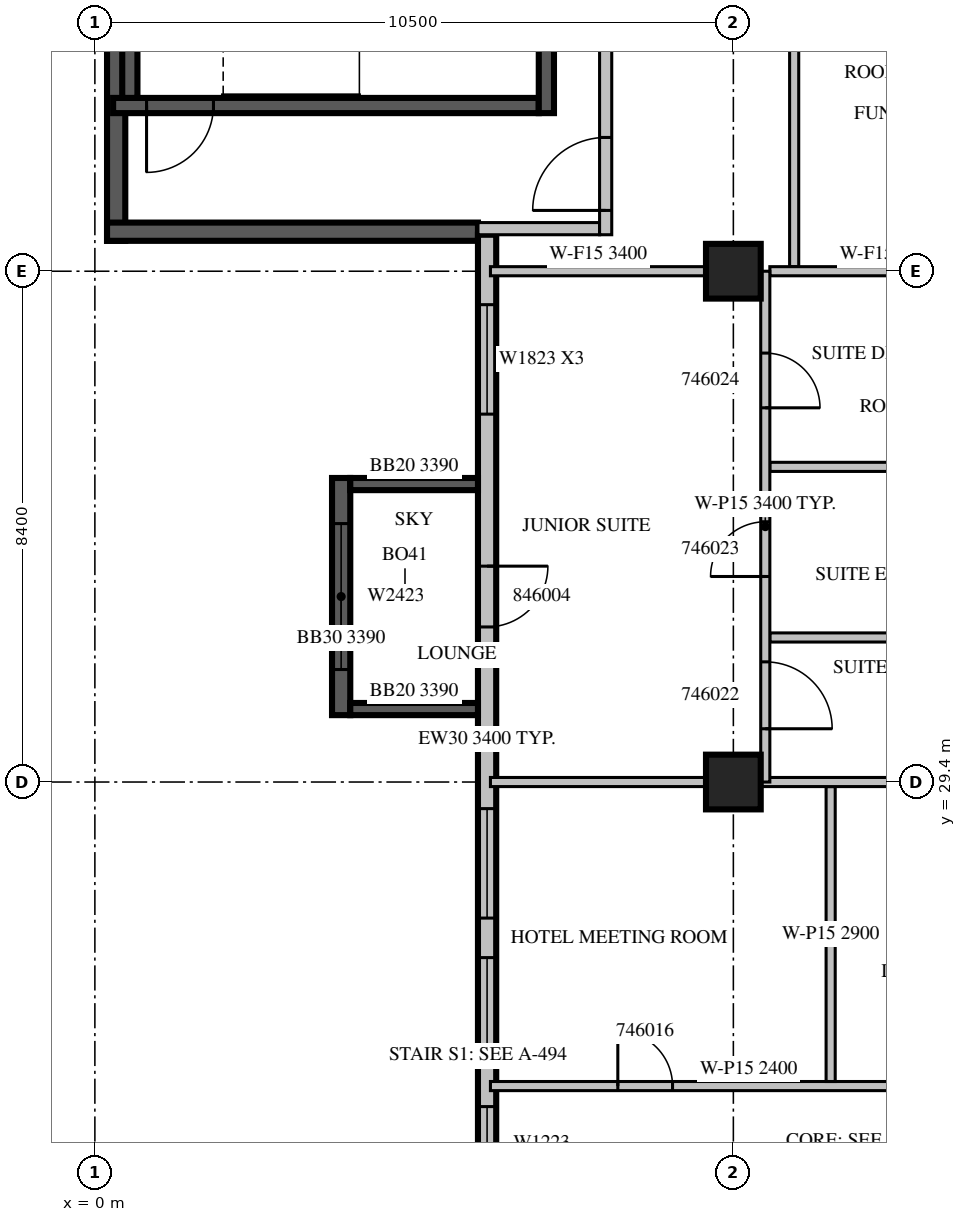
"""IFC4 building model, lengths in metres.
Left out: names, types, materials, properties, quantities, classifications, styles, units other than length and angle.
Written with IfcOpenShell. Run it as: python <this file> out.ifc"""

import sys

from ifc_helpers import new_model, si_unit, direction, frame, frame_2d, origin, origin_2d, place, context, subcontext, project, spatial, rectangle, extrude, source, transform, mapped, element, fill, save


model = new_model("IFC4")
c1 = context("Model", 3, precision=1e-05, world=origin(), true_north=direction((0.0, 1.0)))
c2 = subcontext(c1, "Body", "Model", "MODEL_VIEW")
j1 = project(units=[si_unit("LENGTHUNIT", "METRE"), si_unit("PLANEANGLEUNIT", "RADIAN")], contexts=[c1])
p1 = place(None, origin())
s1 = spatial("IfcSite", under=j1, at=p1, CompositionType="ELEMENT")
p2 = place(p1, origin())
s2 = spatial("IfcBuilding", under=s1, at=p2, CompositionType="ELEMENT")
p3 = place(p2, frame((0.0, 0.0, 208.2)))
s3 = spatial("IfcBuildingStorey", under=s2, at=p3, CompositionType="ELEMENT", Elevation=208.2)
m1 = source(origin(), c2, "Body", "SweptSolid", [
    extrude(rectangle(XDim=0.9, YDim=0.9, at=origin_2d()), origin(), (0.0, 0.0, 1.0), 3.8),
])
for number, where, z_axis, x_axis in (
    (1, (10.5, 29.4, 0.0), (0.0, 0.0, 1.0), (1.0, 0.0, 0.0)),
    (2, (10.5, 37.8, 0.0), (0.0, 0.0, 1.0), (1.0, 0.0, 0.0)),
):
    element("IfcColumn", number, at=place(p3, frame(where, z_axis=z_axis, x_axis=x_axis)), inside=s3, PredefinedType="COLUMN", context=c2, shape_type="MappedRepresentation", body=[
        mapped(m1, transform((0.0, 0.0, 0.0), scale=1.0)),
    ])
m2 = source(origin(), c2, "Body", "SweptSolid", [
    extrude(rectangle(XDim=5.65, YDim=0.3, at=frame_2d((2.825, 0.0))), origin(), (0.0, 0.0, 1.0), 3.4),
])
p4 = place(p3, frame((0.35, 43.95, 0.0), z_axis=(0.0, 0.0, 1.0), x_axis=(0.0, -1.0, 0.0)))
e3 = element("IfcWall", 3, at=p4, inside=s3, PredefinedType="SOLIDWALL", context=c2, shape_type="MappedRepresentation", body=[
    mapped(m2, transform((0.0, 0.0, 0.0), scale=1.0)),
])
m3 = source(origin(), c2, "Body", "SweptSolid", [
    extrude(rectangle(XDim=6.1, YDim=0.3, at=frame_2d((3.05, 0.0))), origin(), (0.0, 0.0, 1.0), 3.4),
])
p5 = place(p3, frame((0.2, 38.45, 0.0), z_axis=(0.0, 0.0, 1.0), x_axis=(1.0, 0.0, 0.0)))
e4 = element("IfcWall", 4, at=p5, inside=s3, PredefinedType="SOLIDWALL", context=c2, shape_type="MappedRepresentation", body=[
    mapped(m3, transform((0.0, 0.0, 0.0), scale=1.0)),
])
m4 = source(origin(), c2, "Body", "SweptSolid", [
    extrude(rectangle(XDim=16.6, YDim=0.3, at=frame_2d((8.3, 0.0))), origin(), (0.0, 0.0, 1.0), 3.4),
])
p6 = place(p3, frame((6.45, 38.4, 0.0), z_axis=(0.0, 0.0, 1.0), x_axis=(0.0, -1.0, 0.0)))
e5 = element("IfcWall", 5, at=p6, inside=s3, PredefinedType="STANDARD", context=c2, shape_type="MappedRepresentation", body=[
    mapped(m4, transform((0.0, 0.0, 0.0), scale=1.0)),
])
m5 = source(origin(), c2, "Body", "SweptSolid", [
    extrude(rectangle(XDim=1.8, YDim=2.3, at=frame_2d((0.9, 1.15))), frame((0.0, 0.16, 0.0), z_axis=(0.0, -1.0, 0.0), x_axis=(1.0, 0.0, 0.0)), (0.0, 0.0, 1.0), 0.32),
])
p7 = place(p6, frame((1.15, 0.0, 0.6)))
e6 = element("IfcOpeningElement", 6, at=p7, cuts=e5, PredefinedType="OPENING", context=c2, shape_type="MappedRepresentation", body=[
    mapped(m5, transform((0.0, 0.0, 0.0), scale=1.0)),
])
p8 = place(p6, frame((9.438, 0.0, 0.6)))
e7 = element("IfcOpeningElement", 7, at=p8, cuts=e5, PredefinedType="OPENING", context=c2, shape_type="MappedRepresentation", body=[
    mapped(m5, transform((0.0, 0.0, 0.0), scale=1.0)),
])
m6 = source(origin(), c2, "Body", "SweptSolid", [
    extrude(rectangle(XDim=1.2, YDim=2.3, at=frame_2d((0.6, 1.15))), frame((0.0, 0.16, 0.0), z_axis=(0.0, -1.0, 0.0), x_axis=(1.0, 0.0, 0.0)), (0.0, 0.0, 1.0), 0.32),
])
p9 = place(p6, frame((14.338, 0.0, 0.6)))
e8 = element("IfcOpeningElement", 8, at=p9, cuts=e5, PredefinedType="OPENING", context=c2, shape_type="MappedRepresentation", body=[
    mapped(m6, transform((0.0, 0.0, 0.0), scale=1.0)),
])
p10 = place(p6, frame((11.887, 0.0, 0.6)))
e9 = element("IfcOpeningElement", 9, at=p10, cuts=e5, PredefinedType="OPENING", context=c2, shape_type="MappedRepresentation", body=[
    mapped(m5, transform((0.0, 0.0, 0.0), scale=1.0)),
])
m7 = source(origin(), c2, "Body", "SweptSolid", [
    extrude(rectangle(XDim=1.0, YDim=2.1, at=frame_2d((0.5, 1.05))), frame((0.0, 0.16, 0.0), z_axis=(0.0, -1.0, 0.0), x_axis=(1.0, 0.0, 0.0)), (0.0, 0.0, 1.0), 0.32),
])
p11 = place(p6, frame((5.45, 0.0, 0.0)))
e10 = element("IfcOpeningElement", 10, at=p11, cuts=e5, PredefinedType="OPENING", context=c2, shape_type="MappedRepresentation", body=[
    mapped(m7, transform((0.0, 0.0, 0.0), scale=1.0)),
])
m8 = source(origin(), c2, "Body", "SweptSolid", [
    extrude(rectangle(XDim=3.9, YDim=0.3, at=frame_2d((1.95, 0.0))), origin(), (0.0, 0.0, 1.0), 3.39),
])
p12 = place(p3, frame((4.05, 34.4, 0.0), z_axis=(0.0, 0.0, 1.0), x_axis=(0.0, -1.0, 0.0)))
e11 = element("IfcWall", 11, at=p12, inside=s3, PredefinedType="SOLIDWALL", context=c2, shape_type="MappedRepresentation", body=[
    mapped(m8, transform((0.0, 0.0, 0.0), scale=1.0)),
])
m9 = source(origin(), c2, "Body", "SweptSolid", [
    extrude(rectangle(XDim=2.4, YDim=2.3, at=frame_2d((1.2, 1.15))), frame((0.0, 0.16, 0.0), z_axis=(0.0, -1.0, 0.0), x_axis=(1.0, 0.0, 0.0)), (0.0, 0.0, 1.0), 0.32),
])
p13 = place(p12, frame((0.75, 0.0, 0.6)))
e12 = element("IfcOpeningElement", 12, at=p13, cuts=e11, PredefinedType="OPENING", context=c2, shape_type="MappedRepresentation", body=[
    mapped(m9, transform((0.0, 0.0, 0.0), scale=1.0)),
])
m10 = source(origin(), c2, "Body", "SweptSolid", [
    extrude(rectangle(XDim=2.1, YDim=0.2, at=frame_2d((1.05, 0.0))), origin(), (0.0, 0.0, 1.0), 3.39),
])
for number, where, z_axis, x_axis in (
    (13, (6.3, 34.3, 0.0), (0.0, 0.0, 1.0), (-1.0, 0.0, 0.0)),
    (14, (6.3, 30.6, 0.0), (0.0, 0.0, 1.0), (-1.0, 0.0, 0.0)),
):
    element("IfcWall", number, at=place(p3, frame(where, z_axis=z_axis, x_axis=x_axis)), inside=s3, PredefinedType="SOLIDWALL", context=c2, shape_type="MappedRepresentation", body=[
        mapped(m10, transform((0.0, 0.0, 0.0), scale=1.0)),
    ])
m11 = source(origin(), c2, "Body", "SweptSolid", [
    extrude(rectangle(XDim=7.0, YDim=0.25, at=frame_2d((3.5, 0.0))), origin(), (0.0, 0.0, 1.0), 3.4),
])
p14 = place(p3, frame((0.3, 40.525, 0.0), z_axis=(0.0, 0.0, 1.0), x_axis=(1.0, 0.0, 0.0)))
e15 = element("IfcWall", 15, at=p14, inside=s3, PredefinedType="SOLIDWALL", context=c2, shape_type="MappedRepresentation", body=[
    mapped(m11, transform((0.0, 0.0, 0.0), scale=1.0)),
])
m12 = source(origin(), c2, "Body", "SweptSolid", [
    extrude(rectangle(XDim=1.1, YDim=2.1, at=frame_2d((0.55, 1.05))), frame((0.0, 0.135, 0.0), z_axis=(0.0, -1.0, 0.0), x_axis=(1.0, 0.0, 0.0)), (0.0, 0.0, 1.0), 0.27),
])
p15 = place(p14, frame((0.55, 0.0, 0.0)))
e16 = element("IfcOpeningElement", 16, at=p15, cuts=e15, PredefinedType="OPENING", context=c2, shape_type="MappedRepresentation", body=[
    mapped(m12, transform((0.0, 0.0, 0.0), scale=1.0)),
])
m13 = source(origin(), c2, "Body", "SweptSolid", [
    extrude(rectangle(XDim=3.45, YDim=0.25, at=frame_2d((1.725, 0.0))), origin(), (0.0, 0.0, 1.0), 3.4),
])
p16 = place(p3, frame((7.425, 40.4, 0.0), z_axis=(0.0, 0.0, 1.0), x_axis=(0.0, 1.0, 0.0)))
e17 = element("IfcWall", 17, at=p16, inside=s3, PredefinedType="SOLIDWALL", context=c2, shape_type="MappedRepresentation", body=[
    mapped(m13, transform((0.0, 0.0, 0.0), scale=1.0)),
])
m14 = source(origin(), c2, "Body", "SweptSolid", [
    extrude(rectangle(XDim=2.95, YDim=0.25, at=frame_2d((1.475, 0.0))), origin(), (0.0, 0.0, 1.0), 3.4),
])
p17 = place(p3, frame((0.575, 40.65, 0.0), z_axis=(0.0, 0.0, 1.0), x_axis=(0.0, 1.0, 0.0)))
e18 = element("IfcWall", 18, at=p17, inside=s3, PredefinedType="SOLIDWALL", context=c2, shape_type="MappedRepresentation", body=[
    mapped(m14, transform((0.0, 0.0, 0.0), scale=1.0)),
])
m15 = source(origin(), c2, "Body", "SweptSolid", [
    extrude(rectangle(XDim=2.0, YDim=0.2, at=frame_2d((1.0, 0.0))), origin(), (0.0, 0.0, 1.0), 3.4),
])
p18 = place(p3, frame((6.3, 38.5, 0.0), z_axis=(0.0, 0.0, 1.0), x_axis=(1.0, 0.0, 0.0)))
e19 = element("IfcWall", 19, at=p18, inside=s3, PredefinedType="PARTITIONING", context=c2, shape_type="MappedRepresentation", body=[
    mapped(m15, transform((0.0, 0.0, 0.0), scale=1.0)),
])
m16 = source(origin(), c2, "Body", "SweptSolid", [
    extrude(rectangle(XDim=5.45, YDim=0.2, at=frame_2d((2.725, 0.0))), origin(), (0.0, 0.0, 1.0), 3.4),
])
p19 = place(p3, frame((8.4, 38.4, 0.0), z_axis=(0.0, 0.0, 1.0), x_axis=(0.0, 1.0, 0.0)))
e20 = element("IfcWall", 20, at=p19, inside=s3, PredefinedType="PARTITIONING", context=c2, shape_type="MappedRepresentation", body=[
    mapped(m16, transform((0.0, 0.0, 0.0), scale=1.0)),
])
m17 = source(origin(), c2, "Body", "SweptSolid", [
    extrude(rectangle(XDim=1.2, YDim=2.1, at=frame_2d((0.6, 1.05))), frame((0.0, 0.11, 0.0), z_axis=(0.0, -1.0, 0.0), x_axis=(1.0, 0.0, 0.0)), (0.0, 0.0, 1.0), 0.22),
])
p20 = place(p19, frame((0.4, 0.0, 0.0)))
e21 = element("IfcOpeningElement", 21, at=p20, cuts=e20, PredefinedType="OPENING", context=c2, shape_type="MappedRepresentation", body=[
    mapped(m17, transform((0.0, 0.0, 0.0), scale=1.0)),
])
m18 = source(origin(), c2, "Body", "SweptSolid", [
    extrude(rectangle(XDim=0.9, YDim=2.1, at=frame_2d((0.45, 1.05))), frame((0.0, 0.11, 0.0), z_axis=(0.0, -1.0, 0.0), x_axis=(1.0, 0.0, 0.0)), (0.0, 0.0, 1.0), 0.22),
])
p21 = place(p19, frame((3.25, 0.0, 0.0)))
e22 = element("IfcOpeningElement", 22, at=p21, cuts=e20, PredefinedType="OPENING", context=c2, shape_type="MappedRepresentation", body=[
    mapped(m18, transform((0.0, 0.0, 0.0), scale=1.0)),
])
p22 = place(p3, frame((6.505, 24.4, 0.0), z_axis=(0.0, 0.0, 1.0), x_axis=(1.0, 0.0, 0.0)))
e23 = element("IfcWall", 23, at=p22, inside=s3, PredefinedType="PARTITIONING", context=c2, shape_type="SweptSolid", body=[
    extrude(rectangle(XDim=8.495, YDim=0.15, at=frame_2d((4.247, 0.0))), origin(), (0.0, 0.0, 1.0), 2.4),
])
m19 = source(origin(), c2, "Body", "SweptSolid", [
    extrude(rectangle(XDim=0.9, YDim=2.1, at=frame_2d((0.45, 1.05))), frame((0.0, 0.085, 0.0), z_axis=(0.0, -1.0, 0.0), x_axis=(1.0, 0.0, 0.0)), (0.0, 0.0, 1.0), 0.17),
])
p23 = place(p22, frame((2.095, 0.0, 0.0)))
e24 = element("IfcOpeningElement", 24, at=p23, cuts=e23, PredefinedType="OPENING", context=c2, shape_type="MappedRepresentation", body=[
    mapped(m19, transform((0.0, 0.0, 0.0), scale=1.0)),
])
p24 = place(p22, frame((7.17, 0.0, 0.0)))
e25 = element("IfcOpeningElement", 25, at=p24, cuts=e23, PredefinedType="OPENING", context=c2, shape_type="MappedRepresentation", body=[
    mapped(m19, transform((0.0, 0.0, 0.0), scale=1.0)),
])
p25 = place(p3, frame((12.1, 24.475, 0.0), z_axis=(0.0, 0.0, 1.0), x_axis=(0.0, 1.0, 0.0)))
e26 = element("IfcWall", 26, at=p25, inside=s3, PredefinedType="PARTITIONING", context=c2, shape_type="SweptSolid", body=[
    extrude(rectangle(XDim=4.85, YDim=0.15, at=frame_2d((2.425, 0.0))), origin(), (0.0, 0.0, 1.0), 2.9),
])
m20 = source(origin(), c2, "Body", "SweptSolid", [
    extrude(rectangle(XDim=3.546, YDim=0.15, at=frame_2d((1.773, 0.0))), origin(), (0.0, 0.0, 1.0), 3.4),
])
p26 = place(p3, frame((10.051, 29.4, 0.0), z_axis=(0.0, 0.0, 1.0), x_axis=(-1.0, 0.0, 0.0)))
e27 = element("IfcWall", 27, at=p26, inside=s3, PredefinedType="PARTITIONING", context=c2, shape_type="MappedRepresentation", body=[
    mapped(m20, transform((0.0, 0.0, 0.0), scale=1.0)),
])
m21 = source(origin(), c2, "Body", "SweptSolid", [
    extrude(rectangle(XDim=4.051, YDim=0.15, at=frame_2d((2.026, 0.0))), origin(), (0.0, 0.0, 1.0), 3.4),
])
p27 = place(p3, frame((15.0, 29.4, 0.0), z_axis=(0.0, 0.0, 1.0), x_axis=(-1.0, 0.0, 0.0)))
e28 = element("IfcWall", 28, at=p27, inside=s3, PredefinedType="PARTITIONING", context=c2, shape_type="MappedRepresentation", body=[
    mapped(m21, transform((0.0, 0.0, 0.0), scale=1.0)),
])
m22 = source(origin(), c2, "Body", "SweptSolid", [
    extrude(rectangle(XDim=6.45, YDim=0.15, at=frame_2d((3.225, 0.0))), origin(), (0.0, 0.0, 1.0), 3.4),
])
p28 = place(p3, frame((11.5, 44.325, 0.0), z_axis=(0.0, 0.0, 1.0), x_axis=(0.0, -1.0, 0.0)))
e29 = element("IfcWall", 29, at=p28, inside=s3, PredefinedType="PARTITIONING", context=c2, shape_type="MappedRepresentation", body=[
    mapped(m22, transform((0.0, 0.0, 0.0), scale=1.0)),
])
m23 = source(origin(), c2, "Body", "SweptSolid", [
    extrude(rectangle(XDim=3.9, YDim=0.15, at=frame_2d((1.95, 0.0))), origin(), (0.0, 0.0, 1.0), 3.4),
])
for number, where, z_axis, x_axis in (
    (30, (15.0, 31.777, 0.0), (0.0, 0.0, 1.0), (-1.0, 0.0, 0.0)),
    (31, (15.0, 34.583, 0.0), (0.0, 0.0, 1.0), (-1.0, 0.0, 0.0)),
):
    element("IfcWall", number, at=place(p3, frame(where, z_axis=z_axis, x_axis=x_axis)), inside=s3, PredefinedType="PARTITIONING", context=c2, shape_type="MappedRepresentation", body=[
        mapped(m23, transform((0.0, 0.0, 0.0), scale=1.0)),
    ])
p29 = place(p3, frame((10.051, 37.8, 0.0), z_axis=(0.0, 0.0, 1.0), x_axis=(-1.0, 0.0, 0.0)))
e32 = element("IfcWall", 32, at=p29, inside=s3, PredefinedType="PARTITIONING", context=c2, shape_type="MappedRepresentation", body=[
    mapped(m20, transform((0.0, 0.0, 0.0), scale=1.0)),
])
p30 = place(p3, frame((15.0, 37.8, 0.0), z_axis=(0.0, 0.0, 1.0), x_axis=(-1.0, 0.0, 0.0)))
e33 = element("IfcWall", 33, at=p30, inside=s3, PredefinedType="PARTITIONING", context=c2, shape_type="MappedRepresentation", body=[
    mapped(m23, transform((0.0, 0.0, 0.0), scale=1.0)),
])
m24 = source(origin(), c2, "Body", "SweptSolid", [
    extrude(rectangle(XDim=8.4, YDim=0.15, at=frame_2d((4.2, 0.0))), origin(), (0.0, 0.0, 1.0), 3.4),
])
p31 = place(p3, frame((11.025, 29.4, 0.0), z_axis=(0.0, 0.0, 1.0), x_axis=(0.0, 1.0, 0.0)))
e34 = element("IfcWall", 34, at=p31, inside=s3, PredefinedType="PARTITIONING", context=c2, shape_type="MappedRepresentation", body=[
    mapped(m24, transform((0.0, 0.0, 0.0), scale=1.0)),
])
m25 = source(origin(), c2, "Body", "SweptSolid", [
    extrude(rectangle(XDim=1.1, YDim=2.1, at=frame_2d((0.55, 1.05))), frame((0.0, 0.085, 0.0), z_axis=(0.0, -1.0, 0.0), x_axis=(1.0, 0.0, 0.0)), (0.0, 0.0, 1.0), 0.17),
])
p32 = place(p31, frame((0.876, 0.0, 0.0)))
e35 = element("IfcOpeningElement", 35, at=p32, cuts=e34, PredefinedType="OPENING", context=c2, shape_type="MappedRepresentation", body=[
    mapped(m25, transform((0.0, 0.0, 0.0), scale=1.0)),
])
p33 = place(p31, frame((3.38, 0.0, 0.0)))
e36 = element("IfcOpeningElement", 36, at=p33, cuts=e34, PredefinedType="OPENING", context=c2, shape_type="MappedRepresentation", body=[
    mapped(m19, transform((0.0, 0.0, 0.0), scale=1.0)),
])
p34 = place(p31, frame((6.154, 0.0, 0.0)))
e37 = element("IfcOpeningElement", 37, at=p34, cuts=e34, PredefinedType="OPENING", context=c2, shape_type="MappedRepresentation", body=[
    mapped(m19, transform((0.0, 0.0, 0.0), scale=1.0)),
])
m26 = source(origin(), c2, "Body", "SweptSolid", [
    extrude(rectangle(XDim=1.8, YDim=2.3, at=frame_2d((0.9, 1.15))), frame((0.0, 0.03, 0.0), z_axis=(0.0, -1.0, 0.0), x_axis=(1.0, 0.0, 0.0)), (0.0, 0.0, 1.0), 0.06),
])
p35 = place(p7, origin())
e38 = element("IfcWindow", 38, at=p35, inside=s3, PartitioningType="SINGLE_PANEL", PredefinedType="WINDOW", context=c2, shape_type="MappedRepresentation", body=[
    mapped(m26, transform((0.0, 0.0, 0.0), scale=1.0)),
])
fill(e6, e38)
p36 = place(p8, origin())
e39 = element("IfcWindow", 39, at=p36, inside=s3, PartitioningType="SINGLE_PANEL", PredefinedType="WINDOW", context=c2, shape_type="MappedRepresentation", body=[
    mapped(m26, transform((0.0, 0.0, 0.0), scale=1.0)),
])
fill(e7, e39)
m27 = source(origin(), c2, "Body", "SweptSolid", [
    extrude(rectangle(XDim=1.2, YDim=2.3, at=frame_2d((0.6, 1.15))), frame((0.0, 0.03, 0.0), z_axis=(0.0, -1.0, 0.0), x_axis=(1.0, 0.0, 0.0)), (0.0, 0.0, 1.0), 0.06),
])
p37 = place(p9, origin())
e40 = element("IfcWindow", 40, at=p37, inside=s3, PartitioningType="SINGLE_PANEL", PredefinedType="WINDOW", context=c2, shape_type="MappedRepresentation", body=[
    mapped(m27, transform((0.0, 0.0, 0.0), scale=1.0)),
])
fill(e8, e40)
p38 = place(p10, origin())
e41 = element("IfcWindow", 41, at=p38, inside=s3, PartitioningType="SINGLE_PANEL", PredefinedType="WINDOW", context=c2, shape_type="MappedRepresentation", body=[
    mapped(m26, transform((0.0, 0.0, 0.0), scale=1.0)),
])
fill(e9, e41)
m28 = source(origin(), c2, "Body", "SweptSolid", [
    extrude(rectangle(XDim=2.4, YDim=2.3, at=frame_2d((1.2, 1.15))), frame((0.0, 0.03, 0.0), z_axis=(0.0, -1.0, 0.0), x_axis=(1.0, 0.0, 0.0)), (0.0, 0.0, 1.0), 0.06),
])
p39 = place(p13, origin())
e42 = element("IfcWindow", 42, at=p39, inside=s3, PartitioningType="SINGLE_PANEL", PredefinedType="WINDOW", context=c2, shape_type="MappedRepresentation", body=[
    mapped(m28, transform((0.0, 0.0, 0.0), scale=1.0)),
])
fill(e12, e42)
m29 = source(origin(), c2, "Body", "SweptSolid", [
    extrude(rectangle(XDim=1.1, YDim=2.1, at=frame_2d((0.55, 1.05))), frame((0.0, 0.025, 0.0), z_axis=(0.0, -1.0, 0.0), x_axis=(1.0, 0.0, 0.0)), (0.0, 0.0, 1.0), 0.05),
])
p40 = place(p15, origin())
e43 = element("IfcDoor", 43, at=p40, inside=s3, OperationType="SINGLE_SWING_RIGHT", PredefinedType="DOOR", context=c2, shape_type="MappedRepresentation", body=[
    mapped(m29, transform((0.0, 0.0, 0.0), scale=1.0)),
])
fill(e16, e43)
m30 = source(origin(), c2, "Body", "SweptSolid", [
    extrude(rectangle(XDim=1.2, YDim=2.1, at=frame_2d((0.6, 1.05))), frame((0.0, 0.025, 0.0), z_axis=(0.0, -1.0, 0.0), x_axis=(1.0, 0.0, 0.0)), (0.0, 0.0, 1.0), 0.05),
])
p41 = place(p20, origin())
e44 = element("IfcDoor", 44, at=p41, inside=s3, OperationType="SINGLE_SWING_LEFT", PredefinedType="DOOR", context=c2, shape_type="MappedRepresentation", body=[
    mapped(m30, transform((0.0, 0.0, 0.0), scale=1.0)),
])
fill(e21, e44)
m31 = source(origin(), c2, "Body", "SweptSolid", [
    extrude(rectangle(XDim=0.9, YDim=2.1, at=frame_2d((0.45, 1.05))), frame((0.0, 0.025, 0.0), z_axis=(0.0, -1.0, 0.0), x_axis=(1.0, 0.0, 0.0)), (0.0, 0.0, 1.0), 0.05),
])
p42 = place(p23, origin())
e45 = element("IfcDoor", 45, at=p42, inside=s3, OperationType="SINGLE_SWING_LEFT", PredefinedType="DOOR", context=c2, shape_type="MappedRepresentation", body=[
    mapped(m31, transform((0.0, 0.0, 0.0), scale=1.0)),
])
fill(e24, e45)
p43 = place(p32, origin())
e46 = element("IfcDoor", 46, at=p43, inside=s3, OperationType="SINGLE_SWING_RIGHT", PredefinedType="DOOR", context=c2, shape_type="MappedRepresentation", body=[
    mapped(m29, transform((0.0, 0.0, 0.0), scale=1.0)),
])
fill(e35, e46)
p44 = place(p33, origin())
e47 = element("IfcDoor", 47, at=p44, inside=s3, OperationType="SINGLE_SWING_LEFT", PredefinedType="DOOR", context=c2, shape_type="MappedRepresentation", body=[
    mapped(m31, transform((0.0, 0.0, 0.0), scale=1.0)),
])
fill(e36, e47)
p45 = place(p34, origin())
e48 = element("IfcDoor", 48, at=p45, inside=s3, OperationType="SINGLE_SWING_RIGHT", PredefinedType="DOOR", context=c2, shape_type="MappedRepresentation", body=[
    mapped(m31, transform((0.0, 0.0, 0.0), scale=1.0)),
])
fill(e37, e48)
m32 = source(origin(), c2, "Body", "SweptSolid", [
    extrude(rectangle(XDim=1.0, YDim=2.1, at=frame_2d((0.5, 1.05))), frame((0.0, 0.025, 0.0), z_axis=(0.0, -1.0, 0.0), x_axis=(1.0, 0.0, 0.0)), (0.0, 0.0, 1.0), 0.05),
])
p46 = place(p11, origin())
e49 = element("IfcDoor", 49, at=p46, inside=s3, OperationType="SINGLE_SWING_LEFT", PredefinedType="DOOR", context=c2, shape_type="MappedRepresentation", body=[
    mapped(m32, transform((0.0, 0.0, 0.0), scale=1.0)),
])
fill(e10, e49)
save(model, sys.argv[1])
